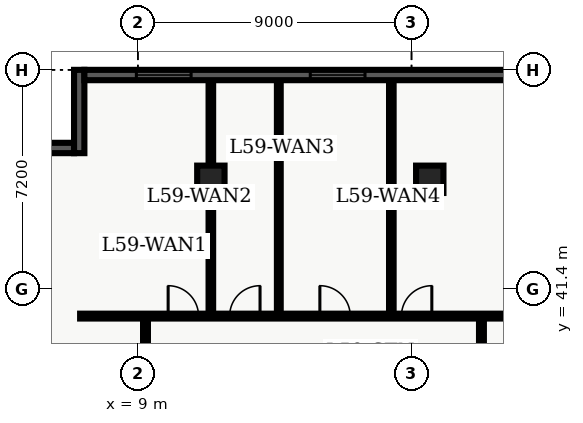
"""IFC4 building model, lengths in metres.
Left out: names, types, materials, properties, quantities, classifications, styles, units other than length and angle.
Written with IfcOpenShell. Run it as: python <this file> out.ifc"""

import sys

from ifc_helpers import new_model, entity, si_unit, converted_unit, direction, frame, origin_with_axes, origin_2d_with_axis, place, context, subcontext, project, spatial, polyline, rectangle, outline, extrude, element, fill, save


model = new_model("IFC4")
c1 = context("Model", 3, precision=1e-05, world=origin_with_axes(), true_north=direction((0.0, 1.0)))
c2 = subcontext(c1, "Body", "Model", "MODEL_VIEW")
j1 = project(units=[si_unit("LENGTHUNIT", "METRE"), converted_unit("PLANEANGLEUNIT", "DEGREE", entity("IfcPlaneAngleMeasure", 0.017), si_unit("PLANEANGLEUNIT", "RADIAN"), dimensions=[0, 0, 0, 0, 0, 0, 0])], contexts=[c1])
p1 = place(None, origin_with_axes())
s1 = spatial("IfcSite", under=j1, at=p1, CompositionType="ELEMENT")
p2 = place(p1, origin_with_axes())
s2 = spatial("IfcBuilding", under=s1, at=p2, CompositionType="ELEMENT")
p3 = place(p2, frame((0.0, 0.0, 240.3), z_axis=(0.0, 0.0, 1.0), x_axis=(1.0, 0.0, 0.0)))
s3 = spatial("IfcBuildingStorey", under=s2, at=p3, CompositionType="ELEMENT", Elevation=240.3)
for number, where, z_axis, x_axis in (
    (1, (11.4, 45.0, 0.0), (0.0, 0.0, 1.0), (1.0, 0.0, 0.0)),
    (2, (18.6, 45.0, 0.0), (0.0, 0.0, 1.0), (1.0, 0.0, 0.0)),
):
    element("IfcColumn", number, at=place(p3, frame(where, z_axis=z_axis, x_axis=x_axis)), inside=s3, PredefinedType="COLUMN", context=c2, shape_type="SweptSolid", body=[
        extrude(rectangle(XDim=0.9, YDim=0.9, at=origin_2d_with_axis()), origin_with_axes(), (0.0, 0.0, 1.0), 3.9),
    ])
p4 = place(p3, frame((7.1, 40.5, 0.0), z_axis=(0.0, 0.0, 1.0), x_axis=(1.0, 0.0, 0.0)))
e3 = element("IfcWall", 3, at=p4, inside=s3, PredefinedType="PARTITIONING", context=c2, shape_type="SweptSolid", body=[
    extrude(outline(polyline([(0.0, -0.08), (24.965, -0.08), (24.965, 0.08), (0.0, 0.08), (0.0, -0.08)])), origin_with_axes(), (0.0, 0.0, 1.0), 2.7),
])
p5 = place(p4, frame((3.395, 0.0, 0.0), z_axis=(0.0, 0.0, 1.0), x_axis=(1.0, 0.0, 0.0)))
e4 = element("IfcOpeningElement", 4, at=p5, cuts=e3, PredefinedType="OPENING", context=c2, shape_type="SweptSolid", body=[
    extrude(rectangle(XDim=1.0, YDim=0.18, at=origin_2d_with_axis()), origin_with_axes(), (0.0, 0.0, 1.0), 2.15),
])
p6 = place(p4, frame((5.418, 0.0, 0.0), z_axis=(0.0, 0.0, 1.0), x_axis=(1.0, 0.0, 0.0)))
e5 = element("IfcOpeningElement", 5, at=p6, cuts=e3, PredefinedType="OPENING", context=c2, shape_type="SweptSolid", body=[
    extrude(rectangle(XDim=1.0, YDim=0.18, at=origin_2d_with_axis()), origin_with_axes(), (0.0, 0.0, 1.0), 2.15),
])
p7 = place(p4, frame((8.386, 0.0, 0.0), z_axis=(0.0, 0.0, 1.0), x_axis=(1.0, 0.0, 0.0)))
e6 = element("IfcOpeningElement", 6, at=p7, cuts=e3, PredefinedType="OPENING", context=c2, shape_type="SweptSolid", body=[
    extrude(rectangle(XDim=1.0, YDim=0.18, at=origin_2d_with_axis()), origin_with_axes(), (0.0, 0.0, 1.0), 2.15),
])
p8 = place(p4, frame((11.068, 0.0, 0.0), z_axis=(0.0, 0.0, 1.0), x_axis=(1.0, 0.0, 0.0)))
e7 = element("IfcOpeningElement", 7, at=p8, cuts=e3, PredefinedType="OPENING", context=c2, shape_type="SweptSolid", body=[
    extrude(rectangle(XDim=1.0, YDim=0.18, at=origin_2d_with_axis()), origin_with_axes(), (0.0, 0.0, 1.0), 2.15),
])
p9 = place(p3, frame((20.3, 7.8, 0.0), z_axis=(0.0, 0.0, 1.0), x_axis=(0.0, 1.0, 0.0)))
e8 = element("IfcWall", 8, at=p9, inside=s3, PredefinedType="PARTITIONING", context=c2, shape_type="SweptSolid", body=[
    extrude(outline(polyline([(0.0, -0.08), (32.7, -0.08), (32.7, 0.08), (0.0, 0.08), (0.0, -0.08)])), origin_with_axes(), (0.0, 0.0, 1.0), 2.7),
])
p10 = place(p9, frame((14.55, 0.0, 0.0), z_axis=(0.0, 0.0, 1.0), x_axis=(1.0, 0.0, 0.0)))
e9 = element("IfcOpeningElement", 9, at=p10, cuts=e8, PredefinedType="OPENING", context=c2, shape_type="SweptSolid", body=[
    extrude(rectangle(XDim=0.9, YDim=0.18, at=origin_2d_with_axis()), origin_with_axes(), (0.0, 0.0, 1.0), 2.15),
])
p11 = place(p9, frame((18.86, 0.0, 0.0), z_axis=(0.0, 0.0, 1.0), x_axis=(1.0, 0.0, 0.0)))
e10 = element("IfcOpeningElement", 10, at=p11, cuts=e8, PredefinedType="OPENING", context=c2, shape_type="SweptSolid", body=[
    extrude(rectangle(XDim=1.0, YDim=0.18, at=origin_2d_with_axis()), origin_with_axes(), (0.0, 0.0, 1.0), 2.15),
])
p12 = place(p9, frame((24.276, 0.0, 0.0), z_axis=(0.0, 0.0, 1.0), x_axis=(1.0, 0.0, 0.0)))
e11 = element("IfcOpeningElement", 11, at=p12, cuts=e8, PredefinedType="OPENING", context=c2, shape_type="SweptSolid", body=[
    extrude(rectangle(XDim=1.0, YDim=0.18, at=origin_2d_with_axis()), origin_with_axes(), (0.0, 0.0, 1.0), 2.15),
])
p13 = place(p9, frame((27.491, 0.0, 0.0), z_axis=(0.0, 0.0, 1.0), x_axis=(1.0, 0.0, 0.0)))
e12 = element("IfcOpeningElement", 12, at=p13, cuts=e8, PredefinedType="OPENING", context=c2, shape_type="SweptSolid", body=[
    extrude(rectangle(XDim=1.0, YDim=0.18, at=origin_2d_with_axis()), origin_with_axes(), (0.0, 0.0, 1.0), 2.15),
])
p14 = place(p9, frame((5.775, 0.0, 0.0), z_axis=(0.0, 0.0, 1.0), x_axis=(1.0, 0.0, 0.0)))
e13 = element("IfcOpeningElement", 13, at=p14, cuts=e8, PredefinedType="OPENING", context=c2, shape_type="SweptSolid", body=[
    extrude(rectangle(XDim=1.05, YDim=0.18, at=origin_2d_with_axis()), origin_with_axes(), (0.0, 0.0, 1.0), 2.15),
])
p15 = place(p3, frame((9.25, 24.4, 0.0), z_axis=(0.0, 0.0, 1.0), x_axis=(0.0, 1.0, 0.0)))
e14 = element("IfcWall", 14, at=p15, inside=s3, PredefinedType="PARTITIONING", context=c2, shape_type="SweptSolid", body=[
    extrude(outline(polyline([(0.0, -0.08), (16.1, -0.08), (16.1, 0.08), (0.0, 0.08), (0.0, -0.08)])), origin_with_axes(), (0.0, 0.0, 1.0), 2.7),
])
p16 = place(p15, frame((3.775, 0.0, 0.0), z_axis=(0.0, 0.0, 1.0), x_axis=(1.0, 0.0, 0.0)))
e15 = element("IfcOpeningElement", 15, at=p16, cuts=e14, PredefinedType="OPENING", context=c2, shape_type="SweptSolid", body=[
    extrude(rectangle(XDim=1.0, YDim=0.18, at=origin_2d_with_axis()), origin_with_axes(), (0.0, 0.0, 1.0), 2.15),
])
p17 = place(p15, frame((9.412, 0.0, 0.0), z_axis=(0.0, 0.0, 1.0), x_axis=(1.0, 0.0, 0.0)))
e16 = element("IfcOpeningElement", 16, at=p17, cuts=e14, PredefinedType="OPENING", context=c2, shape_type="SweptSolid", body=[
    extrude(rectangle(XDim=1.0, YDim=0.18, at=origin_2d_with_axis()), origin_with_axes(), (0.0, 0.0, 1.0), 2.15),
])
p18 = place(p15, frame((13.662, 0.0, 0.0), z_axis=(0.0, 0.0, 1.0), x_axis=(1.0, 0.0, 0.0)))
e17 = element("IfcOpeningElement", 17, at=p18, cuts=e14, PredefinedType="OPENING", context=c2, shape_type="SweptSolid", body=[
    extrude(rectangle(XDim=1.0, YDim=0.18, at=origin_2d_with_axis()), origin_with_axes(), (0.0, 0.0, 1.0), 2.15),
])
p19 = place(p3, frame((11.4, 40.6, 0.0), z_axis=(0.0, 0.0, 1.0), x_axis=(0.0, 1.0, 0.0)))
e18 = element("IfcWall", 18, at=p19, inside=s3, PredefinedType="PARTITIONING", context=c2, shape_type="SweptSolid", body=[
    extrude(outline(polyline([(0.0, -0.075), (7.665, -0.075), (7.665, 0.075), (0.0, 0.075), (0.0, -0.075)])), origin_with_axes(), (0.0, 0.0, 1.0), 2.7),
])
p20 = place(p3, frame((13.635, 40.6, 0.0), z_axis=(0.0, 0.0, 1.0), x_axis=(0.0, 1.0, 0.0)))
e19 = element("IfcWall", 19, at=p20, inside=s3, PredefinedType="PARTITIONING", context=c2, shape_type="SweptSolid", body=[
    extrude(outline(polyline([(0.0, -0.062), (7.665, -0.062), (7.665, 0.062), (0.0, 0.062), (0.0, -0.062)])), origin_with_axes(), (0.0, 0.0, 1.0), 2.7),
])
p21 = place(p3, frame((17.336, 40.6, 0.0), z_axis=(0.0, 0.0, 1.0), x_axis=(0.0, 1.0, 0.0)))
e20 = element("IfcWall", 20, at=p21, inside=s3, PredefinedType="PARTITIONING", context=c2, shape_type="SweptSolid", body=[
    extrude(outline(polyline([(0.0, -0.075), (7.665, -0.075), (7.665, 0.075), (0.0, 0.075), (0.0, -0.075)])), origin_with_axes(), (0.0, 0.0, 1.0), 2.7),
])
p22 = place(p3, frame((4.84, 46.03, 0.0), z_axis=(0.0, 0.0, 1.0), x_axis=(1.0, 0.0, 0.0)))
e21 = element("IfcWall", 21, at=p22, inside=s3, PredefinedType="SOLIDWALL", context=c2, shape_type="SweptSolid", body=[
    extrude(outline(polyline([(0.0, -0.17), (2.06, -0.17), (2.06, 0.17), (0.0, 0.17), (0.0, -0.17)])), origin_with_axes(), (0.0, 0.0, 1.0), 3.66),
])
p23 = place(p3, frame((7.07, 45.86, 0.0), z_axis=(0.0, 0.0, 1.0), x_axis=(0.0, 1.0, 0.0)))
e22 = element("IfcWall", 22, at=p23, inside=s3, PredefinedType="SOLIDWALL", context=c2, shape_type="SweptSolid", body=[
    extrude(outline(polyline([(0.0, -0.17), (2.74, -0.17), (2.74, 0.17), (0.0, 0.17), (0.0, -0.17)])), origin_with_axes(), (0.0, 0.0, 1.0), 3.66),
])
p24 = place(p3, frame((7.24, 48.43, 0.0), z_axis=(0.0, 0.0, 1.0), x_axis=(1.0, 0.0, 0.0)))
e23 = element("IfcWall", 23, at=p24, inside=s3, PredefinedType="SOLIDWALL", context=c2, shape_type="SweptSolid", body=[
    extrude(outline(polyline([(0.0, -0.17), (18.36, -0.17), (18.36, 0.17), (0.0, 0.17), (0.0, -0.17)])), origin_with_axes(), (0.0, 0.0, 1.0), 3.66),
])
p25 = place(p24, frame((2.61, 0.0, 0.45), z_axis=(0.0, 0.0, 1.0), x_axis=(1.0, 0.0, 0.0)))
e24 = element("IfcOpeningElement", 24, at=p25, cuts=e23, PredefinedType="OPENING", context=c2, shape_type="SweptSolid", body=[
    extrude(rectangle(XDim=1.8, YDim=0.36, at=origin_2d_with_axis()), origin_with_axes(), (0.0, 0.0, 1.0), 2.1),
])
p26 = place(p24, frame((8.33, 0.0, 0.45), z_axis=(0.0, 0.0, 1.0), x_axis=(1.0, 0.0, 0.0)))
e25 = element("IfcOpeningElement", 25, at=p26, cuts=e23, PredefinedType="OPENING", context=c2, shape_type="SweptSolid", body=[
    extrude(rectangle(XDim=1.8, YDim=0.36, at=origin_2d_with_axis()), origin_with_axes(), (0.0, 0.0, 1.0), 2.1),
])
p27 = place(p24, frame((14.9, 0.0, 0.45), z_axis=(0.0, 0.0, 1.0), x_axis=(1.0, 0.0, 0.0)))
e26 = element("IfcOpeningElement", 26, at=p27, cuts=e23, PredefinedType="OPENING", context=c2, shape_type="SweptSolid", body=[
    extrude(rectangle(XDim=1.8, YDim=0.36, at=origin_2d_with_axis()), origin_with_axes(), (0.0, 0.0, 1.0), 2.1),
])
p28 = place(p4, frame((3.395, 0.0, 0.0), z_axis=(0.0, 0.0, 1.0), x_axis=(1.0, 0.0, 0.0)))
e27 = element("IfcDoor", 27, at=p28, inside=s3, OperationType="SINGLE_SWING_LEFT", PredefinedType="DOOR", context=c2, shape_type="SweptSolid", body=[
    extrude(rectangle(XDim=1.0, YDim=0.09, at=origin_2d_with_axis()), origin_with_axes(), (0.0, 0.0, 1.0), 2.15),
])
fill(e4, e27)
p29 = place(p4, frame((5.418, 0.0, 0.0), z_axis=(0.0, 0.0, 1.0), x_axis=(1.0, 0.0, 0.0)))
e28 = element("IfcDoor", 28, at=p29, inside=s3, OperationType="SINGLE_SWING_RIGHT", PredefinedType="DOOR", context=c2, shape_type="SweptSolid", body=[
    extrude(rectangle(XDim=1.0, YDim=0.09, at=origin_2d_with_axis()), origin_with_axes(), (0.0, 0.0, 1.0), 2.15),
])
fill(e5, e28)
p30 = place(p4, frame((8.386, 0.0, 0.0), z_axis=(0.0, 0.0, 1.0), x_axis=(1.0, 0.0, 0.0)))
e29 = element("IfcDoor", 29, at=p30, inside=s3, OperationType="SINGLE_SWING_LEFT", PredefinedType="DOOR", context=c2, shape_type="SweptSolid", body=[
    extrude(rectangle(XDim=1.0, YDim=0.09, at=origin_2d_with_axis()), origin_with_axes(), (0.0, 0.0, 1.0), 2.15),
])
fill(e6, e29)
p31 = place(p4, frame((11.068, 0.0, 0.0), z_axis=(0.0, 0.0, 1.0), x_axis=(1.0, 0.0, 0.0)))
e30 = element("IfcDoor", 30, at=p31, inside=s3, OperationType="SINGLE_SWING_RIGHT", PredefinedType="DOOR", context=c2, shape_type="SweptSolid", body=[
    extrude(rectangle(XDim=1.0, YDim=0.09, at=origin_2d_with_axis()), origin_with_axes(), (0.0, 0.0, 1.0), 2.15),
])
fill(e7, e30)
p32 = place(p24, frame((2.61, 0.0, 0.45), z_axis=(0.0, 0.0, 1.0), x_axis=(1.0, 0.0, 0.0)))
e31 = element("IfcWindow", 31, at=p32, inside=s3, PredefinedType="WINDOW", context=c2, shape_type="SweptSolid", body=[
    extrude(rectangle(XDim=1.8, YDim=0.09, at=origin_2d_with_axis()), origin_with_axes(), (0.0, 0.0, 1.0), 2.1),
])
fill(e24, e31)
p33 = place(p24, frame((8.33, 0.0, 0.45), z_axis=(0.0, 0.0, 1.0), x_axis=(1.0, 0.0, 0.0)))
e32 = element("IfcWindow", 32, at=p33, inside=s3, PredefinedType="WINDOW", context=c2, shape_type="SweptSolid", body=[
    extrude(rectangle(XDim=1.8, YDim=0.09, at=origin_2d_with_axis()), origin_with_axes(), (0.0, 0.0, 1.0), 2.1),
])
fill(e25, e32)
save(model, sys.argv[1])
